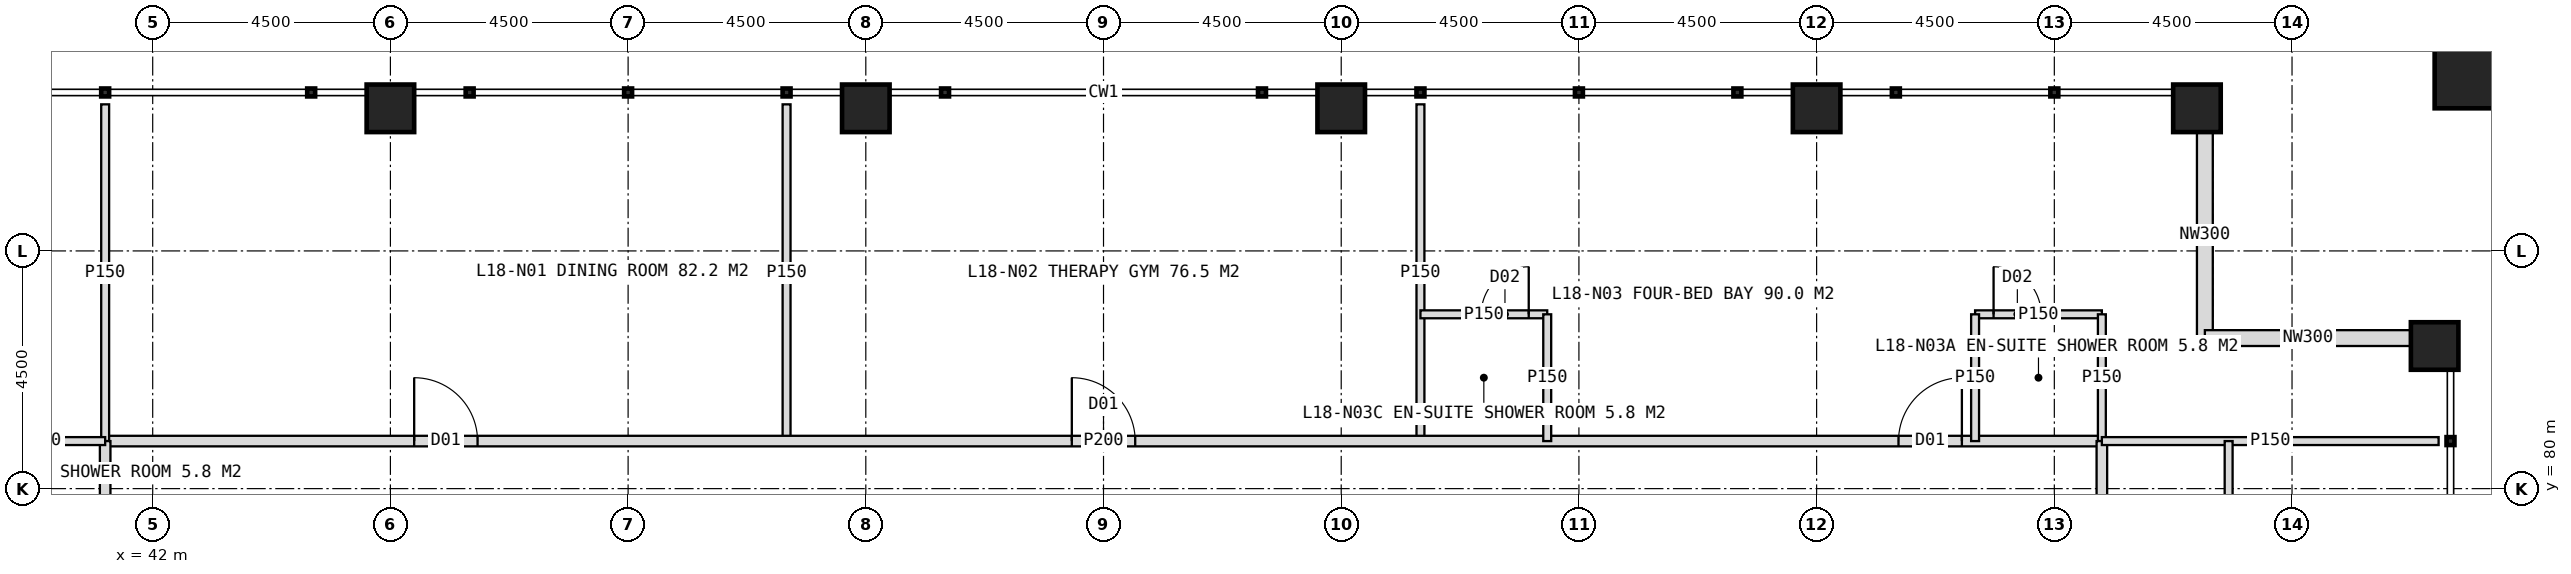
"""IFC4 building model, lengths in metres.
Left out: names, types, materials, properties, quantities, classifications, styles, units other than length and angle.
Written with IfcOpenShell. Run it as: python <this file> out.ifc"""

import sys

from ifc_helpers import new_model, si_unit, direction, frame, frame_2d, origin, origin_2d, place, context, subcontext, project, spatial, rectangle, hollow_rectangle, extrude, element, fill, save


model = new_model("IFC4")
c1 = context("Model", 3, precision=1e-05, world=origin(), true_north=direction((0.0, 1.0)))
c2 = subcontext(c1, "Body", "Model", "MODEL_VIEW")
j1 = project(units=[si_unit("LENGTHUNIT", "METRE"), si_unit("PLANEANGLEUNIT", "RADIAN")], contexts=[c1])
p1 = place(None, origin())
s1 = spatial("IfcSite", under=j1, at=p1, CompositionType="ELEMENT")
p2 = place(p1, origin())
s2 = spatial("IfcBuilding", under=s1, at=p2, CompositionType="ELEMENT")
p3 = place(p2, frame((0.0, 0.0, 79.0)))
s3 = spatial("IfcBuildingStorey", under=s2, at=p3, CompositionType="ELEMENT", Elevation=79.0)
for number, where, z_axis, x_axis in (
    (1, (46.5, 87.2, 0.0), (0.0, 0.0, 1.0), (1.0, 0.0, 0.0)),
    (2, (55.5, 87.2, 0.0), (0.0, 0.0, 1.0), (1.0, 0.0, 0.0)),
    (3, (64.5, 87.2, 0.0), (0.0, 0.0, 1.0), (1.0, 0.0, 0.0)),
    (4, (73.5, 87.2, 0.0), (0.0, 0.0, 1.0), (1.0, 0.0, 0.0)),
    (5, (80.7, 87.2, 0.0), (0.0, 0.0, 1.0), (1.0, 0.0, 0.0)),
    (6, (85.2, 82.7, 0.0), (0.0, 0.0, 1.0), (1.0, 0.0, 0.0)),
):
    element("IfcColumn", number, at=place(p3, frame(where, z_axis=z_axis, x_axis=x_axis)), inside=s3, PredefinedType="COLUMN", context=c2, shape_type="SweptSolid", body=[
        extrude(hollow_rectangle(XDim=0.9, YDim=0.9, WallThickness=0.08, at=origin_2d()), origin(), (0.0, 0.0, 1.0), 4.0),
    ])
p4 = place(p3, frame((86.1, 88.1, 0.0), z_axis=(0.0, 0.0, 1.0), x_axis=(1.0, 0.0, 0.0)))
e7 = element("IfcColumn", 7, at=p4, inside=s3, PredefinedType="COLUMN", context=c2, shape_type="SweptSolid", body=[
    extrude(hollow_rectangle(XDim=1.8, YDim=1.8, WallThickness=0.1, at=origin_2d()), origin(), (0.0, 0.0, 1.0), 4.0),
])
for number, where, z_axis, x_axis in (
    (8, (80.85, 86.75, 0.0), (0.0, 0.0, 1.0), (0.0, -1.0, 0.0)),
    (9, (80.85, 82.85, 0.0), (0.0, 0.0, 1.0), (1.0, 0.0, 0.0)),
):
    element("IfcWall", number, at=place(p3, frame(where, z_axis=z_axis, x_axis=x_axis)), inside=s3, PredefinedType="ELEMENTEDWALL", context=c2, shape_type="SweptSolid", body=[
        extrude(rectangle(XDim=3.9, YDim=0.3, at=frame_2d((1.95, 0.0))), origin(), (0.0, 0.0, 1.0), 2.95),
    ])
for number, where, z_axis, x_axis in (
    (10, (54.0, 80.9, 0.0), (0.0, 0.0, 1.0), (0.0, 1.0, 0.0)),
    (11, (66.0, 80.9, 0.0), (0.0, 0.0, 1.0), (0.0, 1.0, 0.0)),
):
    element("IfcWall", number, at=place(p3, frame(where, z_axis=z_axis, x_axis=x_axis)), inside=s3, PredefinedType="PARTITIONING", context=c2, shape_type="SweptSolid", body=[
        extrude(rectangle(XDim=6.375, YDim=0.15, at=frame_2d((3.188, 0.0))), origin(), (0.0, 0.0, 1.0), 3.75),
    ])
p5 = place(p3, frame((41.1, 80.9, 0.0), z_axis=(0.0, 0.0, 1.0), x_axis=(1.0, 0.0, 0.0)))
e12 = element("IfcWall", 12, at=p5, inside=s3, PredefinedType="PARTITIONING", context=c2, shape_type="SweptSolid", body=[
    extrude(rectangle(XDim=37.8, YDim=0.2, at=frame_2d((18.9, 0.0))), origin(), (0.0, 0.0, 1.0), 3.75),
])
p6 = place(p5, frame((5.85, 0.0, 0.0)))
e13 = element("IfcOpeningElement", 13, at=p6, cuts=e12, PredefinedType="OPENING", context=c2, shape_type="SweptSolid", body=[
    extrude(rectangle(XDim=1.2, YDim=2.2, at=frame_2d((0.6, 1.1))), frame((0.0, 0.11, 0.0), z_axis=(0.0, -1.0, 0.0), x_axis=(1.0, 0.0, 0.0)), (0.0, 0.0, 1.0), 0.22),
])
p7 = place(p5, frame((18.3, 0.0, 0.0)))
e14 = element("IfcOpeningElement", 14, at=p7, cuts=e12, PredefinedType="OPENING", context=c2, shape_type="SweptSolid", body=[
    extrude(rectangle(XDim=1.2, YDim=2.2, at=frame_2d((0.6, 1.1))), frame((0.0, 0.11, 0.0), z_axis=(0.0, -1.0, 0.0), x_axis=(1.0, 0.0, 0.0)), (0.0, 0.0, 1.0), 0.22),
])
p8 = place(p5, frame((33.95, 0.0, 0.0)))
e15 = element("IfcOpeningElement", 15, at=p8, cuts=e12, PredefinedType="OPENING", context=c2, shape_type="SweptSolid", body=[
    extrude(rectangle(XDim=1.2, YDim=2.2, at=frame_2d((0.6, 1.1))), frame((0.0, 0.11, 0.0), z_axis=(0.0, -1.0, 0.0), x_axis=(1.0, 0.0, 0.0)), (0.0, 0.0, 1.0), 0.22),
])
p9 = place(p3, frame((41.1, 80.9, 0.0), z_axis=(0.0, 0.0, 1.0), x_axis=(0.0, 1.0, 0.0)))
e16 = element("IfcWall", 16, at=p9, inside=s3, PredefinedType="PARTITIONING", context=c2, shape_type="SweptSolid", body=[
    extrude(rectangle(XDim=6.375, YDim=0.15, at=frame_2d((3.188, 0.0))), origin(), (0.0, 0.0, 1.0), 3.75),
])
p10 = place(p3, frame((76.5, 83.3, 0.0), z_axis=(0.0, 0.0, 1.0), x_axis=(1.0, 0.0, 0.0)))
e17 = element("IfcWall", 17, at=p10, inside=s3, PredefinedType="PARTITIONING", context=c2, shape_type="SweptSolid", body=[
    extrude(rectangle(XDim=2.4, YDim=0.15, at=frame_2d((1.2, 0.0))), origin(), (0.0, 0.0, 1.0), 3.75),
])
p11 = place(p10, frame((0.35, 0.0, 0.0)))
e18 = element("IfcOpeningElement", 18, at=p11, cuts=e17, PredefinedType="OPENING", context=c2, shape_type="SweptSolid", body=[
    extrude(rectangle(XDim=0.9, YDim=2.1, at=frame_2d((0.45, 1.05))), frame((0.0, 0.085, 0.0), z_axis=(0.0, -1.0, 0.0), x_axis=(1.0, 0.0, 0.0)), (0.0, 0.0, 1.0), 0.17),
])
p12 = place(p3, frame((76.5, 80.9, 0.0), z_axis=(0.0, 0.0, 1.0), x_axis=(0.0, 1.0, 0.0)))
e19 = element("IfcWall", 19, at=p12, inside=s3, PredefinedType="PARTITIONING", context=c2, shape_type="SweptSolid", body=[
    extrude(rectangle(XDim=2.4, YDim=0.15, at=frame_2d((1.2, 0.0))), origin(), (0.0, 0.0, 1.0), 3.75),
])
p13 = place(p3, frame((66.0, 83.3, 0.0), z_axis=(0.0, 0.0, 1.0), x_axis=(1.0, 0.0, 0.0)))
e20 = element("IfcWall", 20, at=p13, inside=s3, PredefinedType="PARTITIONING", context=c2, shape_type="SweptSolid", body=[
    extrude(rectangle(XDim=2.4, YDim=0.15, at=frame_2d((1.2, 0.0))), origin(), (0.0, 0.0, 1.0), 3.75),
])
p14 = place(p13, frame((1.15, 0.0, 0.0)))
e21 = element("IfcOpeningElement", 21, at=p14, cuts=e20, PredefinedType="OPENING", context=c2, shape_type="SweptSolid", body=[
    extrude(rectangle(XDim=0.9, YDim=2.1, at=frame_2d((0.45, 1.05))), frame((0.0, 0.085, 0.0), z_axis=(0.0, -1.0, 0.0), x_axis=(1.0, 0.0, 0.0)), (0.0, 0.0, 1.0), 0.17),
])
for number, where, z_axis, x_axis in (
    (22, (68.4, 80.9, 0.0), (0.0, 0.0, 1.0), (0.0, 1.0, 0.0)),
    (23, (78.9, 80.9, 0.0), (0.0, 0.0, 1.0), (0.0, 1.0, 0.0)),
):
    element("IfcWall", number, at=place(p3, frame(where, z_axis=z_axis, x_axis=x_axis)), inside=s3, PredefinedType="PARTITIONING", context=c2, shape_type="SweptSolid", body=[
        extrude(rectangle(XDim=2.4, YDim=0.15, at=frame_2d((1.2, 0.0))), origin(), (0.0, 0.0, 1.0), 3.75),
    ])
p15 = place(p3, frame((41.1, 43.1, 0.0), z_axis=(0.0, 0.0, 1.0), x_axis=(0.0, 1.0, 0.0)))
e24 = element("IfcWall", 24, at=p15, inside=s3, PredefinedType="PARTITIONING", context=c2, shape_type="SweptSolid", body=[
    extrude(rectangle(XDim=37.8, YDim=0.2, at=frame_2d((18.9, 0.0))), origin(), (0.0, 0.0, 1.0), 3.75),
])
p16 = place(p15, frame((2.45, 0.0, 0.0)))
e25 = element("IfcOpeningElement", 25, at=p16, cuts=e24, PredefinedType="OPENING", context=c2, shape_type="SweptSolid", body=[
    extrude(rectangle(XDim=1.2, YDim=2.2, at=frame_2d((0.6, 1.1))), frame((0.0, 0.11, 0.0), z_axis=(0.0, -1.0, 0.0), x_axis=(1.0, 0.0, 0.0)), (0.0, 0.0, 1.0), 0.22),
])
p17 = place(p15, frame((9.55, 0.0, 0.0)))
e26 = element("IfcOpeningElement", 26, at=p17, cuts=e24, PredefinedType="OPENING", context=c2, shape_type="SweptSolid", body=[
    extrude(rectangle(XDim=1.2, YDim=2.2, at=frame_2d((0.6, 1.1))), frame((0.0, 0.11, 0.0), z_axis=(0.0, -1.0, 0.0), x_axis=(1.0, 0.0, 0.0)), (0.0, 0.0, 1.0), 0.22),
])
p18 = place(p15, frame((15.05, 0.0, 0.0)))
e27 = element("IfcOpeningElement", 27, at=p18, cuts=e24, PredefinedType="OPENING", context=c2, shape_type="SweptSolid", body=[
    extrude(rectangle(XDim=1.2, YDim=2.2, at=frame_2d((0.6, 1.1))), frame((0.0, 0.11, 0.0), z_axis=(0.0, -1.0, 0.0), x_axis=(1.0, 0.0, 0.0)), (0.0, 0.0, 1.0), 0.22),
])
p19 = place(p15, frame((21.55, 0.0, 0.0)))
e28 = element("IfcOpeningElement", 28, at=p19, cuts=e24, PredefinedType="OPENING", context=c2, shape_type="SweptSolid", body=[
    extrude(rectangle(XDim=1.2, YDim=2.2, at=frame_2d((0.6, 1.1))), frame((0.0, 0.11, 0.0), z_axis=(0.0, -1.0, 0.0), x_axis=(1.0, 0.0, 0.0)), (0.0, 0.0, 1.0), 0.22),
])
p20 = place(p15, frame((33.95, 0.0, 0.0)))
e29 = element("IfcOpeningElement", 29, at=p20, cuts=e24, PredefinedType="OPENING", context=c2, shape_type="SweptSolid", body=[
    extrude(rectangle(XDim=1.2, YDim=2.2, at=frame_2d((0.6, 1.1))), frame((0.0, 0.11, 0.0), z_axis=(0.0, -1.0, 0.0), x_axis=(1.0, 0.0, 0.0)), (0.0, 0.0, 1.0), 0.22),
])
p21 = place(p3, frame((41.1, 80.9, 0.0), z_axis=(0.0, 0.0, 1.0), x_axis=(-1.0, 0.0, 0.0)))
e30 = element("IfcWall", 30, at=p21, inside=s3, PredefinedType="PARTITIONING", context=c2, shape_type="SweptSolid", body=[
    extrude(rectangle(XDim=2.4, YDim=0.15, at=frame_2d((1.2, 0.0))), origin(), (0.0, 0.0, 1.0), 3.75),
])
p22 = place(p3, frame((78.9, 80.9, 0.0), z_axis=(0.0, 0.0, 1.0), x_axis=(0.0, -1.0, 0.0)))
e31 = element("IfcWall", 31, at=p22, inside=s3, PredefinedType="PARTITIONING", context=c2, shape_type="SweptSolid", body=[
    extrude(rectangle(XDim=37.8, YDim=0.2, at=frame_2d((18.9, 0.0))), origin(), (0.0, 0.0, 1.0), 3.75),
])
p23 = place(p22, frame((2.45, 0.0, 0.0)))
e32 = element("IfcOpeningElement", 32, at=p23, cuts=e31, PredefinedType="OPENING", context=c2, shape_type="SweptSolid", body=[
    extrude(rectangle(XDim=1.2, YDim=2.2, at=frame_2d((0.6, 1.1))), frame((0.0, 0.11, 0.0), z_axis=(0.0, -1.0, 0.0), x_axis=(1.0, 0.0, 0.0)), (0.0, 0.0, 1.0), 0.22),
])
p24 = place(p22, frame((9.55, 0.0, 0.0)))
e33 = element("IfcOpeningElement", 33, at=p24, cuts=e31, PredefinedType="OPENING", context=c2, shape_type="SweptSolid", body=[
    extrude(rectangle(XDim=1.2, YDim=2.2, at=frame_2d((0.6, 1.1))), frame((0.0, 0.11, 0.0), z_axis=(0.0, -1.0, 0.0), x_axis=(1.0, 0.0, 0.0)), (0.0, 0.0, 1.0), 0.22),
])
p25 = place(p22, frame((15.05, 0.0, 0.0)))
e34 = element("IfcOpeningElement", 34, at=p25, cuts=e31, PredefinedType="OPENING", context=c2, shape_type="SweptSolid", body=[
    extrude(rectangle(XDim=1.2, YDim=2.2, at=frame_2d((0.6, 1.1))), frame((0.0, 0.11, 0.0), z_axis=(0.0, -1.0, 0.0), x_axis=(1.0, 0.0, 0.0)), (0.0, 0.0, 1.0), 0.22),
])
p26 = place(p22, frame((21.55, 0.0, 0.0)))
e35 = element("IfcOpeningElement", 35, at=p26, cuts=e31, PredefinedType="OPENING", context=c2, shape_type="SweptSolid", body=[
    extrude(rectangle(XDim=1.2, YDim=2.2, at=frame_2d((0.6, 1.1))), frame((0.0, 0.11, 0.0), z_axis=(0.0, -1.0, 0.0), x_axis=(1.0, 0.0, 0.0)), (0.0, 0.0, 1.0), 0.22),
])
p27 = place(p22, frame((33.95, 0.0, 0.0)))
e36 = element("IfcOpeningElement", 36, at=p27, cuts=e31, PredefinedType="OPENING", context=c2, shape_type="SweptSolid", body=[
    extrude(rectangle(XDim=1.2, YDim=2.2, at=frame_2d((0.6, 1.1))), frame((0.0, 0.11, 0.0), z_axis=(0.0, -1.0, 0.0), x_axis=(1.0, 0.0, 0.0)), (0.0, 0.0, 1.0), 0.22),
])
p28 = place(p3, frame((78.9, 80.9, 0.0), z_axis=(0.0, 0.0, 1.0), x_axis=(1.0, 0.0, 0.0)))
e37 = element("IfcWall", 37, at=p28, inside=s3, PredefinedType="PARTITIONING", context=c2, shape_type="SweptSolid", body=[
    extrude(rectangle(XDim=6.375, YDim=0.15, at=frame_2d((3.188, 0.0))), origin(), (0.0, 0.0, 1.0), 3.75),
])
p29 = place(p3, frame((81.3, 80.9, 0.0), z_axis=(0.0, 0.0, 1.0), x_axis=(0.0, -1.0, 0.0)))
e38 = element("IfcWall", 38, at=p29, inside=s3, PredefinedType="PARTITIONING", context=c2, shape_type="SweptSolid", body=[
    extrude(rectangle(XDim=3.9, YDim=0.15, at=frame_2d((1.95, 0.0))), origin(), (0.0, 0.0, 1.0), 3.75),
])
p30 = place(p29, frame((2.45, 0.0, 0.0)))
e39 = element("IfcOpeningElement", 39, at=p30, cuts=e38, PredefinedType="OPENING", context=c2, shape_type="SweptSolid", body=[
    extrude(rectangle(XDim=1.2, YDim=2.2, at=frame_2d((0.6, 1.1))), frame((0.0, 0.085, 0.0), z_axis=(0.0, -1.0, 0.0), x_axis=(1.0, 0.0, 0.0)), (0.0, 0.0, 1.0), 0.17),
])
p31 = place(p6, origin())
e40 = element("IfcDoor", 40, at=p31, inside=s3, OperationType="SINGLE_SWING_LEFT", PredefinedType="DOOR", context=c2, shape_type="SweptSolid", body=[
    extrude(rectangle(XDim=1.2, YDim=2.2, at=frame_2d((0.6, 1.1))), frame((0.0, 0.025, 0.0), z_axis=(0.0, -1.0, 0.0), x_axis=(1.0, 0.0, 0.0)), (0.0, 0.0, 1.0), 0.05),
])
fill(e13, e40)
p32 = place(p7, origin())
e41 = element("IfcDoor", 41, at=p32, inside=s3, OperationType="SINGLE_SWING_LEFT", PredefinedType="DOOR", context=c2, shape_type="SweptSolid", body=[
    extrude(rectangle(XDim=1.2, YDim=2.2, at=frame_2d((0.6, 1.1))), frame((0.0, 0.025, 0.0), z_axis=(0.0, -1.0, 0.0), x_axis=(1.0, 0.0, 0.0)), (0.0, 0.0, 1.0), 0.05),
])
fill(e14, e41)
p33 = place(p8, origin())
e42 = element("IfcDoor", 42, at=p33, inside=s3, OperationType="SINGLE_SWING_RIGHT", PredefinedType="DOOR", context=c2, shape_type="SweptSolid", body=[
    extrude(rectangle(XDim=1.2, YDim=2.2, at=frame_2d((0.6, 1.1))), frame((0.0, 0.025, 0.0), z_axis=(0.0, -1.0, 0.0), x_axis=(1.0, 0.0, 0.0)), (0.0, 0.0, 1.0), 0.05),
])
fill(e15, e42)
p34 = place(p11, origin())
e43 = element("IfcDoor", 43, at=p34, inside=s3, OperationType="SINGLE_SWING_LEFT", PredefinedType="DOOR", context=c2, shape_type="SweptSolid", body=[
    extrude(rectangle(XDim=0.9, YDim=2.1, at=frame_2d((0.45, 1.05))), frame((0.0, 0.025, 0.0), z_axis=(0.0, -1.0, 0.0), x_axis=(1.0, 0.0, 0.0)), (0.0, 0.0, 1.0), 0.05),
])
fill(e18, e43)
p35 = place(p14, origin())
e44 = element("IfcDoor", 44, at=p35, inside=s3, OperationType="SINGLE_SWING_RIGHT", PredefinedType="DOOR", context=c2, shape_type="SweptSolid", body=[
    extrude(rectangle(XDim=0.9, YDim=2.1, at=frame_2d((0.45, 1.05))), frame((0.0, 0.025, 0.0), z_axis=(0.0, -1.0, 0.0), x_axis=(1.0, 0.0, 0.0)), (0.0, 0.0, 1.0), 0.05),
])
fill(e21, e44)
save(model, sys.argv[1])
